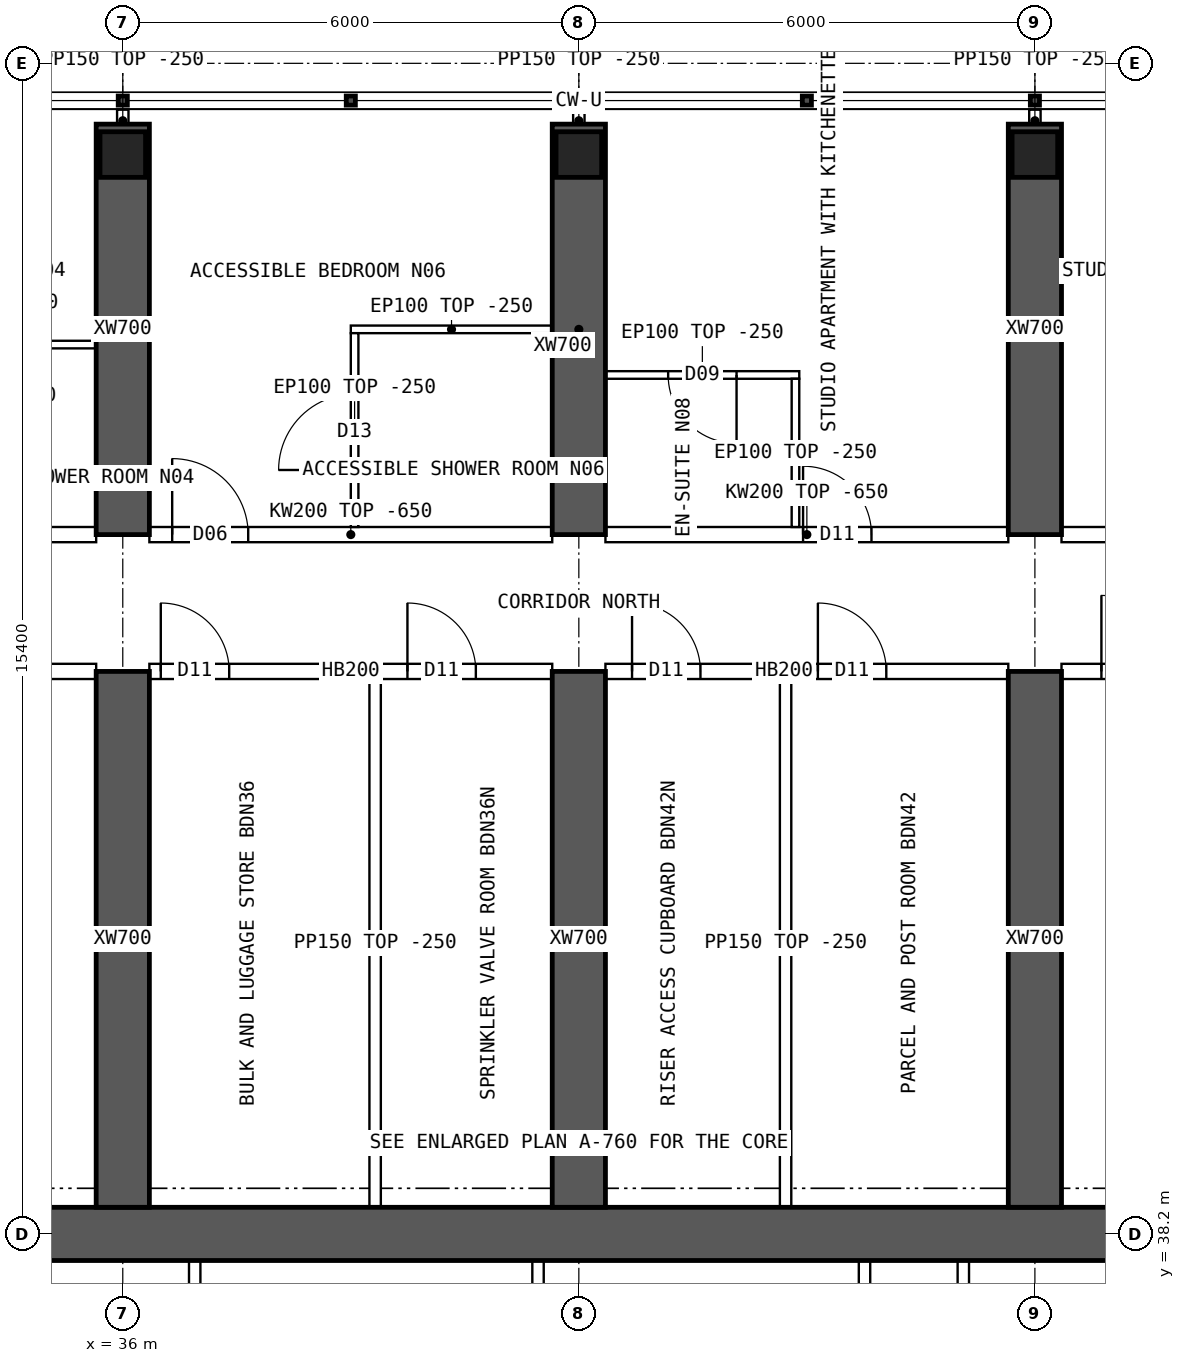
"""IFC4 building model, lengths in metres.
Left out: names, types, materials, properties, quantities, classifications, styles, units other than length and angle.
Written with IfcOpenShell. Run it as: python <this file> out.ifc"""

import sys

from ifc_helpers import new_model, si_unit, direction, frame, frame_2d, origin, origin_2d, place, context, subcontext, project, spatial, polyline, rectangle, hollow_rectangle, outline, extrude, element, fill, save


model = new_model("IFC4")
c1 = context("Model", 3, precision=1e-05, world=origin(), true_north=direction((0.0, 1.0)))
c2 = subcontext(c1, "Body", "Model", "MODEL_VIEW")
j1 = project(units=[si_unit("LENGTHUNIT", "METRE"), si_unit("PLANEANGLEUNIT", "RADIAN")], contexts=[c1])
p1 = place(None, origin())
s1 = spatial("IfcSite", under=j1, at=p1, CompositionType="ELEMENT")
p2 = place(p1, origin())
s2 = spatial("IfcBuilding", under=s1, at=p2, CompositionType="ELEMENT")
p3 = place(p2, frame((0.0, 0.0, 231.55)))
s3 = spatial("IfcBuildingStorey", under=s2, at=p3, CompositionType="ELEMENT", Elevation=231.55)
for number, where, z_axis, x_axis in (
    (1, (36.0, 52.4, 0.0), (0.0, 0.0, 1.0), (1.0, 0.0, 0.0)),
    (2, (42.0, 52.4, 0.0), (0.0, 0.0, 1.0), (1.0, 0.0, 0.0)),
    (3, (48.0, 52.4, 0.0), (0.0, 0.0, 1.0), (1.0, 0.0, 0.0)),
):
    element("IfcColumn", number, at=place(p3, frame(where, z_axis=z_axis, x_axis=x_axis)), inside=s3, PredefinedType="COLUMN", context=c2, shape_type="SweptSolid", body=[
        extrude(hollow_rectangle(XDim=0.6, YDim=0.6, WallThickness=0.06, at=origin_2d()), origin(), (0.0, 0.0, 1.0), 3.75),
    ])
p4 = place(p3, frame((18.0, 38.2, 0.0), z_axis=(0.0, 0.0, 1.0), x_axis=(1.0, 0.0, 0.0)))
e4 = element("IfcWall", 4, at=p4, inside=s3, PredefinedType="SHEAR", context=c2, shape_type="SweptSolid", body=[
    extrude(rectangle(XDim=48.0, YDim=0.7, at=frame_2d((24.0, 0.0))), origin(), (0.0, 0.0, 1.0), 3.75),
])
p5 = place(p3, frame((36.0, 47.4, 0.0), z_axis=(0.0, 0.0, 1.0), x_axis=(0.0, 1.0, 0.0)))
e5 = element("IfcWall", 5, at=p5, inside=s3, PredefinedType="SHEAR", context=c2, shape_type="SweptSolid", body=[
    extrude(rectangle(XDim=5.4, YDim=0.7, at=frame_2d((2.7, 0.0))), origin(), (0.0, 0.0, 1.0), 3.75),
])
p6 = place(p3, frame((36.0, 38.55, 0.0), z_axis=(0.0, 0.0, 1.0), x_axis=(0.0, 1.0, 0.0)))
e6 = element("IfcWall", 6, at=p6, inside=s3, PredefinedType="SHEAR", context=c2, shape_type="SweptSolid", body=[
    extrude(rectangle(XDim=7.05, YDim=0.7, at=frame_2d((3.525, 0.0))), origin(), (0.0, 0.0, 1.0), 3.75),
])
p7 = place(p3, frame((42.0, 47.4, 0.0), z_axis=(0.0, 0.0, 1.0), x_axis=(0.0, 1.0, 0.0)))
e7 = element("IfcWall", 7, at=p7, inside=s3, PredefinedType="SHEAR", context=c2, shape_type="SweptSolid", body=[
    extrude(rectangle(XDim=5.4, YDim=0.7, at=frame_2d((2.7, 0.0))), origin(), (0.0, 0.0, 1.0), 3.75),
])
p8 = place(p3, frame((42.0, 38.55, 0.0), z_axis=(0.0, 0.0, 1.0), x_axis=(0.0, 1.0, 0.0)))
e8 = element("IfcWall", 8, at=p8, inside=s3, PredefinedType="SHEAR", context=c2, shape_type="SweptSolid", body=[
    extrude(rectangle(XDim=7.05, YDim=0.7, at=frame_2d((3.525, 0.0))), origin(), (0.0, 0.0, 1.0), 3.75),
])
p9 = place(p3, frame((48.0, 47.4, 0.0), z_axis=(0.0, 0.0, 1.0), x_axis=(0.0, 1.0, 0.0)))
e9 = element("IfcWall", 9, at=p9, inside=s3, PredefinedType="SHEAR", context=c2, shape_type="SweptSolid", body=[
    extrude(rectangle(XDim=5.4, YDim=0.7, at=frame_2d((2.7, 0.0))), origin(), (0.0, 0.0, 1.0), 3.75),
])
p10 = place(p3, frame((48.0, 38.55, 0.0), z_axis=(0.0, 0.0, 1.0), x_axis=(0.0, 1.0, 0.0)))
e10 = element("IfcWall", 10, at=p10, inside=s3, PredefinedType="SHEAR", context=c2, shape_type="SweptSolid", body=[
    extrude(rectangle(XDim=7.05, YDim=0.7, at=frame_2d((3.525, 0.0))), origin(), (0.0, 0.0, 1.0), 3.75),
])
for number, where, z_axis, x_axis in (
    (11, (36.946, 34.75, 0.0), (0.0, 0.0, 1.0), (0.0, 1.0, 0.0)),
    (12, (41.463, 34.75, 0.0), (0.0, 0.0, 1.0), (0.0, 1.0, 0.0)),
    (13, (45.758, 34.75, 0.0), (0.0, 0.0, 1.0), (0.0, 1.0, 0.0)),
    (14, (47.058, 34.75, 0.0), (0.0, 0.0, 1.0), (0.0, 1.0, 0.0)),
):
    element("IfcWall", number, at=place(p3, frame(where, z_axis=z_axis, x_axis=x_axis)), inside=s3, PredefinedType="SOLIDWALL", context=c2, shape_type="SweptSolid", body=[
        extrude(rectangle(XDim=3.1, YDim=0.15, at=frame_2d((1.55, 0.0))), origin(), (0.0, 0.0, 1.0), 3.5),
    ])
p11 = place(p3, frame((30.35, 47.4, 0.0), z_axis=(0.0, 0.0, 1.0), x_axis=(1.0, 0.0, 0.0)))
e15 = element("IfcWall", 15, at=p11, inside=s3, PredefinedType="SOLIDWALL", context=c2, shape_type="SweptSolid", body=[
    extrude(outline(polyline([(0.0, 0.0), (5.3, 0.0), (5.3, 3.1), (0.0, 3.1), (0.0, 0.0)])), frame((0.0, 0.1, 0.0), z_axis=(0.0, -1.0, 0.0), x_axis=(1.0, 0.0, 0.0)), (0.0, 0.0, 1.0), 0.2),
])
p12 = place(p11, frame((2.3, 0.0, 0.0)))
e16 = element("IfcOpeningElement", 16, at=p12, cuts=e15, PredefinedType="OPENING", context=c2, shape_type="SweptSolid", body=[
    extrude(rectangle(XDim=0.9, YDim=2.1, at=frame_2d((0.45, 1.05))), frame((0.0, 0.11, 0.0), z_axis=(0.0, -1.0, 0.0), x_axis=(1.0, 0.0, 0.0)), (0.0, 0.0, 1.0), 0.22),
])
p13 = place(p3, frame((30.35, 45.6, 0.0), z_axis=(0.0, 0.0, 1.0), x_axis=(1.0, 0.0, 0.0)))
e17 = element("IfcWall", 17, at=p13, inside=s3, PredefinedType="SOLIDWALL", context=c2, shape_type="SweptSolid", body=[
    extrude(rectangle(XDim=5.3, YDim=0.2, at=frame_2d((2.65, 0.0))), origin(), (0.0, 0.0, 1.0), 3.5),
])
p14 = place(p13, frame((0.35, 0.0, 0.0)))
e18 = element("IfcOpeningElement", 18, at=p14, cuts=e17, PredefinedType="OPENING", context=c2, shape_type="SweptSolid", body=[
    extrude(rectangle(XDim=0.9, YDim=2.1, at=frame_2d((0.45, 1.05))), frame((0.0, 0.11, 0.0), z_axis=(0.0, -1.0, 0.0), x_axis=(1.0, 0.0, 0.0)), (0.0, 0.0, 1.0), 0.22),
])
p15 = place(p13, frame((2.745, 0.0, 0.0)))
e19 = element("IfcOpeningElement", 19, at=p15, cuts=e17, PredefinedType="OPENING", context=c2, shape_type="SweptSolid", body=[
    extrude(rectangle(XDim=0.9, YDim=2.1, at=frame_2d((0.45, 1.05))), frame((0.0, 0.11, 0.0), z_axis=(0.0, -1.0, 0.0), x_axis=(1.0, 0.0, 0.0)), (0.0, 0.0, 1.0), 0.22),
])
p16 = place(p3, frame((36.35, 47.4, 0.0), z_axis=(0.0, 0.0, 1.0), x_axis=(1.0, 0.0, 0.0)))
e20 = element("IfcWall", 20, at=p16, inside=s3, PredefinedType="SOLIDWALL", context=c2, shape_type="SweptSolid", body=[
    extrude(outline(polyline([(0.0, 0.0), (5.3, 0.0), (5.3, 3.1), (0.0, 3.1), (0.0, 0.0)])), frame((0.0, 0.1, 0.0), z_axis=(0.0, -1.0, 0.0), x_axis=(1.0, 0.0, 0.0)), (0.0, 0.0, 1.0), 0.2),
])
p17 = place(p16, frame((0.3, 0.0, 0.0)))
e21 = element("IfcOpeningElement", 21, at=p17, cuts=e20, PredefinedType="OPENING", context=c2, shape_type="SweptSolid", body=[
    extrude(rectangle(XDim=1.0, YDim=2.1, at=frame_2d((0.5, 1.05))), frame((0.0, 0.11, 0.0), z_axis=(0.0, -1.0, 0.0), x_axis=(1.0, 0.0, 0.0)), (0.0, 0.0, 1.0), 0.22),
])
p18 = place(p3, frame((36.35, 45.6, 0.0), z_axis=(0.0, 0.0, 1.0), x_axis=(1.0, 0.0, 0.0)))
e22 = element("IfcWall", 22, at=p18, inside=s3, PredefinedType="SOLIDWALL", context=c2, shape_type="SweptSolid", body=[
    extrude(rectangle(XDim=5.3, YDim=0.2, at=frame_2d((2.65, 0.0))), origin(), (0.0, 0.0, 1.0), 3.5),
])
p19 = place(p18, frame((0.15, 0.0, 0.0)))
e23 = element("IfcOpeningElement", 23, at=p19, cuts=e22, PredefinedType="OPENING", context=c2, shape_type="SweptSolid", body=[
    extrude(rectangle(XDim=0.9, YDim=2.1, at=frame_2d((0.45, 1.05))), frame((0.0, 0.11, 0.0), z_axis=(0.0, -1.0, 0.0), x_axis=(1.0, 0.0, 0.0)), (0.0, 0.0, 1.0), 0.22),
])
p20 = place(p18, frame((3.395, 0.0, 0.0)))
e24 = element("IfcOpeningElement", 24, at=p20, cuts=e22, PredefinedType="OPENING", context=c2, shape_type="SweptSolid", body=[
    extrude(rectangle(XDim=0.9, YDim=2.1, at=frame_2d((0.45, 1.05))), frame((0.0, 0.11, 0.0), z_axis=(0.0, -1.0, 0.0), x_axis=(1.0, 0.0, 0.0)), (0.0, 0.0, 1.0), 0.22),
])
p21 = place(p3, frame((42.35, 47.4, 0.0), z_axis=(0.0, 0.0, 1.0), x_axis=(1.0, 0.0, 0.0)))
e25 = element("IfcWall", 25, at=p21, inside=s3, PredefinedType="SOLIDWALL", context=c2, shape_type="SweptSolid", body=[
    extrude(outline(polyline([(0.0, 0.0), (5.3, 0.0), (5.3, 3.1), (0.0, 3.1), (0.0, 0.0)])), frame((0.0, 0.1, 0.0), z_axis=(0.0, -1.0, 0.0), x_axis=(1.0, 0.0, 0.0)), (0.0, 0.0, 1.0), 0.2),
])
p22 = place(p21, frame((2.6, 0.0, 0.0)))
e26 = element("IfcOpeningElement", 26, at=p22, cuts=e25, PredefinedType="OPENING", context=c2, shape_type="SweptSolid", body=[
    extrude(rectangle(XDim=0.9, YDim=2.1, at=frame_2d((0.45, 1.05))), frame((0.0, 0.11, 0.0), z_axis=(0.0, -1.0, 0.0), x_axis=(1.0, 0.0, 0.0)), (0.0, 0.0, 1.0), 0.22),
])
p23 = place(p3, frame((42.35, 45.6, 0.0), z_axis=(0.0, 0.0, 1.0), x_axis=(1.0, 0.0, 0.0)))
e27 = element("IfcWall", 27, at=p23, inside=s3, PredefinedType="SOLIDWALL", context=c2, shape_type="SweptSolid", body=[
    extrude(rectangle(XDim=5.3, YDim=0.2, at=frame_2d((2.65, 0.0))), origin(), (0.0, 0.0, 1.0), 3.5),
])
p24 = place(p23, frame((0.35, 0.0, 0.0)))
e28 = element("IfcOpeningElement", 28, at=p24, cuts=e27, PredefinedType="OPENING", context=c2, shape_type="SweptSolid", body=[
    extrude(rectangle(XDim=0.9, YDim=2.1, at=frame_2d((0.45, 1.05))), frame((0.0, 0.11, 0.0), z_axis=(0.0, -1.0, 0.0), x_axis=(1.0, 0.0, 0.0)), (0.0, 0.0, 1.0), 0.22),
])
p25 = place(p23, frame((2.795, 0.0, 0.0)))
e29 = element("IfcOpeningElement", 29, at=p25, cuts=e27, PredefinedType="OPENING", context=c2, shape_type="SweptSolid", body=[
    extrude(rectangle(XDim=0.9, YDim=2.1, at=frame_2d((0.45, 1.05))), frame((0.0, 0.11, 0.0), z_axis=(0.0, -1.0, 0.0), x_axis=(1.0, 0.0, 0.0)), (0.0, 0.0, 1.0), 0.22),
])
p26 = place(p3, frame((48.35, 47.4, 0.0), z_axis=(0.0, 0.0, 1.0), x_axis=(1.0, 0.0, 0.0)))
e30 = element("IfcWall", 30, at=p26, inside=s3, PredefinedType="SOLIDWALL", context=c2, shape_type="SweptSolid", body=[
    extrude(outline(polyline([(0.0, 0.0), (5.3, 0.0), (5.3, 3.1), (0.0, 3.1), (0.0, 0.0)])), frame((0.0, 0.1, 0.0), z_axis=(0.0, -1.0, 0.0), x_axis=(1.0, 0.0, 0.0)), (0.0, 0.0, 1.0), 0.2),
])
p27 = place(p26, frame((2.3, 0.0, 0.0)))
e31 = element("IfcOpeningElement", 31, at=p27, cuts=e30, PredefinedType="OPENING", context=c2, shape_type="SweptSolid", body=[
    extrude(rectangle(XDim=0.9, YDim=2.1, at=frame_2d((0.45, 1.05))), frame((0.0, 0.11, 0.0), z_axis=(0.0, -1.0, 0.0), x_axis=(1.0, 0.0, 0.0)), (0.0, 0.0, 1.0), 0.22),
])
p28 = place(p3, frame((48.35, 45.6, 0.0), z_axis=(0.0, 0.0, 1.0), x_axis=(1.0, 0.0, 0.0)))
e32 = element("IfcWall", 32, at=p28, inside=s3, PredefinedType="SOLIDWALL", context=c2, shape_type="SweptSolid", body=[
    extrude(rectangle(XDim=5.3, YDim=0.2, at=frame_2d((2.65, 0.0))), origin(), (0.0, 0.0, 1.0), 3.5),
])
p29 = place(p28, frame((0.525, 0.0, 0.0)))
e33 = element("IfcOpeningElement", 33, at=p29, cuts=e32, PredefinedType="OPENING", context=c2, shape_type="SweptSolid", body=[
    extrude(rectangle(XDim=1.0, YDim=2.1, at=frame_2d((0.5, 1.05))), frame((0.0, 0.11, 0.0), z_axis=(0.0, -1.0, 0.0), x_axis=(1.0, 0.0, 0.0)), (0.0, 0.0, 1.0), 0.22),
])
p30 = place(p3, frame((32.5, 49.9, 0.0), z_axis=(0.0, 0.0, 1.0), x_axis=(1.0, 0.0, 0.0)))
e34 = element("IfcWall", 34, at=p30, inside=s3, PredefinedType="PARTITIONING", context=c2, shape_type="SweptSolid", body=[
    extrude(rectangle(XDim=3.15, YDim=0.1, at=frame_2d((1.575, 0.0))), origin(), (0.0, 0.0, 1.0), 3.5),
])
p31 = place(p30, frame((0.25, 0.0, 0.0)))
e35 = element("IfcOpeningElement", 35, at=p31, cuts=e34, PredefinedType="OPENING", context=c2, shape_type="SweptSolid", body=[
    extrude(rectangle(XDim=0.8, YDim=2.1, at=frame_2d((0.4, 1.05))), frame((0.0, 0.06, 0.0), z_axis=(0.0, -1.0, 0.0), x_axis=(1.0, 0.0, 0.0)), (0.0, 0.0, 1.0), 0.12),
])
p32 = place(p3, frame((39.0, 50.1, 0.0), z_axis=(0.0, 0.0, 1.0), x_axis=(1.0, 0.0, 0.0)))
e36 = element("IfcWall", 36, at=p32, inside=s3, PredefinedType="PARTITIONING", context=c2, shape_type="SweptSolid", body=[
    extrude(rectangle(XDim=2.65, YDim=0.1, at=frame_2d((1.325, 0.0))), origin(), (0.0, 0.0, 1.0), 3.5),
])
p33 = place(p3, frame((39.05, 50.05, 0.0), z_axis=(0.0, 0.0, 1.0), x_axis=(0.0, -1.0, 0.0)))
e37 = element("IfcWall", 37, at=p33, inside=s3, PredefinedType="PARTITIONING", context=c2, shape_type="SweptSolid", body=[
    extrude(outline(polyline([(0.0, 0.0), (2.55, 0.0), (2.55, 3.1), (2.502, 3.1), (2.5, 3.5), (0.0, 3.5), (0.0, 0.0)])), frame((0.0, 0.05, 0.0), z_axis=(0.0, -1.0, 0.0), x_axis=(1.0, 0.0, 0.0)), (0.0, 0.0, 1.0), 0.1),
])
p34 = place(p33, frame((0.8, 0.0, 0.0)))
e38 = element("IfcOpeningElement", 38, at=p34, cuts=e37, PredefinedType="OPENING", context=c2, shape_type="SweptSolid", body=[
    extrude(rectangle(XDim=1.0, YDim=2.1, at=frame_2d((0.5, 1.05))), frame((0.0, 0.06, 0.0), z_axis=(0.0, -1.0, 0.0), x_axis=(1.0, 0.0, 0.0)), (0.0, 0.0, 1.0), 0.12),
])
p35 = place(p3, frame((42.35, 49.5, 0.0), z_axis=(0.0, 0.0, 1.0), x_axis=(1.0, 0.0, 0.0)))
e39 = element("IfcWall", 39, at=p35, inside=s3, PredefinedType="PARTITIONING", context=c2, shape_type="SweptSolid", body=[
    extrude(rectangle(XDim=2.55, YDim=0.1, at=frame_2d((1.275, 0.0))), origin(), (0.0, 0.0, 1.0), 3.5),
])
p36 = place(p35, frame((0.825, 0.0, 0.0)))
e40 = element("IfcOpeningElement", 40, at=p36, cuts=e39, PredefinedType="OPENING", context=c2, shape_type="SweptSolid", body=[
    extrude(rectangle(XDim=0.9, YDim=2.1, at=frame_2d((0.45, 1.05))), frame((0.0, 0.06, 0.0), z_axis=(0.0, -1.0, 0.0), x_axis=(1.0, 0.0, 0.0)), (0.0, 0.0, 1.0), 0.12),
])
p37 = place(p3, frame((44.85, 49.45, 0.0), z_axis=(0.0, 0.0, 1.0), x_axis=(0.0, -1.0, 0.0)))
e41 = element("IfcWall", 41, at=p37, inside=s3, PredefinedType="PARTITIONING", context=c2, shape_type="SweptSolid", body=[
    extrude(outline(polyline([(0.0, 0.0), (1.95, 0.0), (1.95, 3.1), (1.902, 3.1), (1.9, 3.5), (0.0, 3.5), (0.0, 0.0)])), frame((0.0, 0.05, 0.0), z_axis=(0.0, -1.0, 0.0), x_axis=(1.0, 0.0, 0.0)), (0.0, 0.0, 1.0), 0.1),
])
for number, where, z_axis, x_axis in (
    (42, (39.32, 38.55, 0.0), (0.0, 0.0, 1.0), (0.0, 1.0, 0.0)),
    (43, (44.72, 38.55, 0.0), (0.0, 0.0, 1.0), (0.0, 1.0, 0.0)),
):
    element("IfcWall", number, at=place(p3, frame(where, z_axis=z_axis, x_axis=x_axis)), inside=s3, PredefinedType="PARTITIONING", context=c2, shape_type="SweptSolid", body=[
        extrude(rectangle(XDim=6.95, YDim=0.15, at=frame_2d((3.475, 0.0))), origin(), (0.0, 0.0, 1.0), 3.5),
    ])
for number, where, z_axis, x_axis in (
    (44, (36.0, 52.7, 0.0), (0.0, 0.0, 1.0), (0.0, 1.0, 0.0)),
    (45, (42.0, 52.7, 0.0), (0.0, 0.0, 1.0), (0.0, 1.0, 0.0)),
    (46, (48.0, 52.7, 0.0), (0.0, 0.0, 1.0), (0.0, 1.0, 0.0)),
):
    element("IfcWall", number, at=place(p3, frame(where, z_axis=z_axis, x_axis=x_axis)), inside=s3, PredefinedType="PARTITIONING", context=c2, shape_type="SweptSolid", body=[
        extrude(rectangle(XDim=0.29, YDim=0.15, at=frame_2d((0.145, 0.0))), origin(), (0.0, 0.0, 1.0), 3.5),
    ])
p38 = place(p34, origin())
e47 = element("IfcDoor", 47, at=p38, inside=s3, OperationType="SINGLE_SWING_RIGHT", PredefinedType="DOOR", context=c2, shape_type="SweptSolid", body=[
    extrude(rectangle(XDim=1.0, YDim=2.1, at=frame_2d((0.5, 1.05))), frame((0.0, 0.025, 0.0), z_axis=(0.0, -1.0, 0.0), x_axis=(1.0, 0.0, 0.0)), (0.0, 0.0, 1.0), 0.05),
])
fill(e38, e47)
p39 = place(p17, origin())
e48 = element("IfcDoor", 48, at=p39, inside=s3, OperationType="SINGLE_SWING_LEFT", PredefinedType="DOOR", context=c2, shape_type="SweptSolid", body=[
    extrude(rectangle(XDim=1.0, YDim=2.1, at=frame_2d((0.5, 1.05))), frame((0.0, 0.025, 0.0), z_axis=(0.0, -1.0, 0.0), x_axis=(1.0, 0.0, 0.0)), (0.0, 0.0, 1.0), 0.05),
])
fill(e21, e48)
p40 = place(p36, origin())
e49 = element("IfcDoor", 49, at=p40, inside=s3, OperationType="SINGLE_SWING_RIGHT", PredefinedType="DOOR", context=c2, shape_type="SweptSolid", body=[
    extrude(rectangle(XDim=0.9, YDim=2.1, at=frame_2d((0.45, 1.05))), frame((0.0, 0.025, 0.0), z_axis=(0.0, -1.0, 0.0), x_axis=(1.0, 0.0, 0.0)), (0.0, 0.0, 1.0), 0.05),
])
fill(e40, e49)
p41 = place(p22, origin())
e50 = element("IfcDoor", 50, at=p41, inside=s3, OperationType="SINGLE_SWING_LEFT", PredefinedType="DOOR", context=c2, shape_type="SweptSolid", body=[
    extrude(rectangle(XDim=0.9, YDim=2.1, at=frame_2d((0.45, 1.05))), frame((0.0, 0.025, 0.0), z_axis=(0.0, -1.0, 0.0), x_axis=(1.0, 0.0, 0.0)), (0.0, 0.0, 1.0), 0.05),
])
fill(e26, e50)
p42 = place(p19, origin())
e51 = element("IfcDoor", 51, at=p42, inside=s3, OperationType="SINGLE_SWING_LEFT", PredefinedType="DOOR", context=c2, shape_type="SweptSolid", body=[
    extrude(rectangle(XDim=0.9, YDim=2.1, at=frame_2d((0.45, 1.05))), frame((0.0, 0.025, 0.0), z_axis=(0.0, -1.0, 0.0), x_axis=(1.0, 0.0, 0.0)), (0.0, 0.0, 1.0), 0.05),
])
fill(e23, e51)
p43 = place(p20, origin())
e52 = element("IfcDoor", 52, at=p43, inside=s3, OperationType="SINGLE_SWING_LEFT", PredefinedType="DOOR", context=c2, shape_type="SweptSolid", body=[
    extrude(rectangle(XDim=0.9, YDim=2.1, at=frame_2d((0.45, 1.05))), frame((0.0, 0.025, 0.0), z_axis=(0.0, -1.0, 0.0), x_axis=(1.0, 0.0, 0.0)), (0.0, 0.0, 1.0), 0.05),
])
fill(e24, e52)
p44 = place(p24, origin())
e53 = element("IfcDoor", 53, at=p44, inside=s3, OperationType="SINGLE_SWING_LEFT", PredefinedType="DOOR", context=c2, shape_type="SweptSolid", body=[
    extrude(rectangle(XDim=0.9, YDim=2.1, at=frame_2d((0.45, 1.05))), frame((0.0, 0.025, 0.0), z_axis=(0.0, -1.0, 0.0), x_axis=(1.0, 0.0, 0.0)), (0.0, 0.0, 1.0), 0.05),
])
fill(e28, e53)
p45 = place(p25, origin())
e54 = element("IfcDoor", 54, at=p45, inside=s3, OperationType="SINGLE_SWING_LEFT", PredefinedType="DOOR", context=c2, shape_type="SweptSolid", body=[
    extrude(rectangle(XDim=0.9, YDim=2.1, at=frame_2d((0.45, 1.05))), frame((0.0, 0.025, 0.0), z_axis=(0.0, -1.0, 0.0), x_axis=(1.0, 0.0, 0.0)), (0.0, 0.0, 1.0), 0.05),
])
fill(e29, e54)
p46 = place(p29, origin())
e55 = element("IfcDoor", 55, at=p46, inside=s3, OperationType="SINGLE_SWING_LEFT", PredefinedType="DOOR", context=c2, shape_type="SweptSolid", body=[
    extrude(rectangle(XDim=1.0, YDim=2.1, at=frame_2d((0.5, 1.05))), frame((0.0, 0.025, 0.0), z_axis=(0.0, -1.0, 0.0), x_axis=(1.0, 0.0, 0.0)), (0.0, 0.0, 1.0), 0.05),
])
fill(e33, e55)
save(model, sys.argv[1])
